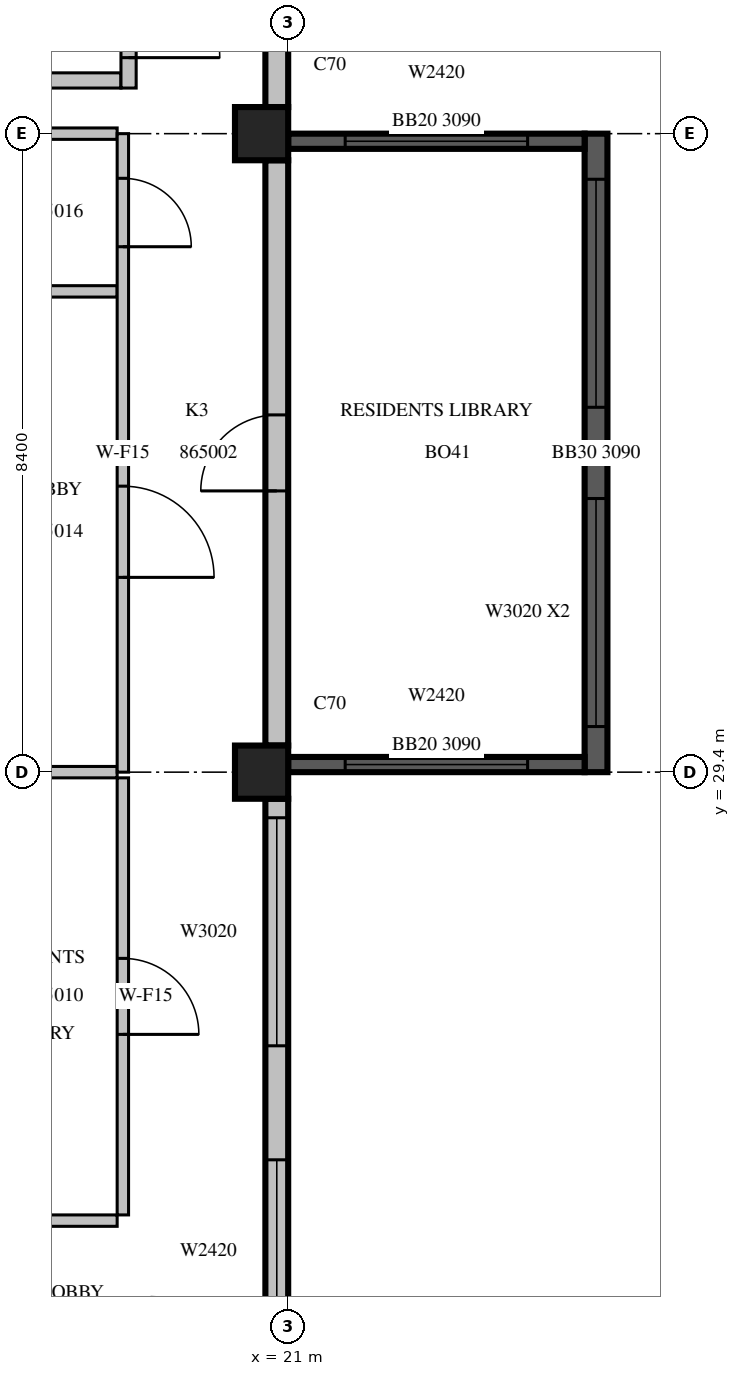
"""IFC4 building model, lengths in metres.
Left out: names, types, materials, properties, quantities, classifications, styles, units other than length and angle.
Written with IfcOpenShell. Run it as: python <this file> out.ifc"""

import sys

from ifc_helpers import new_model, si_unit, direction, frame, frame_2d, origin, origin_2d, place, context, subcontext, project, spatial, rectangle, extrude, source, transform, mapped, element, fill, save


model = new_model("IFC4")
c1 = context("Model", 3, precision=1e-05, world=origin(), true_north=direction((0.0, 1.0)))
c2 = subcontext(c1, "Body", "Model", "MODEL_VIEW")
j1 = project(units=[si_unit("LENGTHUNIT", "METRE"), si_unit("PLANEANGLEUNIT", "RADIAN")], contexts=[c1])
p1 = place(None, origin())
s1 = spatial("IfcSite", under=j1, at=p1, CompositionType="ELEMENT")
p2 = place(p1, origin())
s2 = spatial("IfcBuilding", under=s1, at=p2, CompositionType="ELEMENT")
p3 = place(p2, frame((0.0, 0.0, 288.0)))
s3 = spatial("IfcBuildingStorey", under=s2, at=p3, CompositionType="ELEMENT", Elevation=288.0)
m1 = source(origin(), c2, "Body", "SweptSolid", [
    extrude(rectangle(XDim=0.7, YDim=0.7, at=origin_2d()), origin(), (0.0, 0.0, 1.0), 3.5),
])
for number, where, z_axis, x_axis in (
    (1, (20.65, 29.4, 0.0), (0.0, 0.0, 1.0), (1.0, 0.0, 0.0)),
    (2, (20.65, 37.8, 0.0), (0.0, 0.0, 1.0), (1.0, 0.0, 0.0)),
):
    element("IfcColumn", number, at=place(p3, frame(where, z_axis=z_axis, x_axis=x_axis)), inside=s3, PredefinedType="COLUMN", context=c2, shape_type="MappedRepresentation", body=[
        mapped(m1, transform((0.0, 0.0, 0.0), scale=1.0)),
    ])
m2 = source(origin(), c2, "Body", "SweptSolid", [
    extrude(rectangle(XDim=7.45, YDim=0.3, at=frame_2d((3.725, 0.0))), origin(), (0.0, 0.0, 1.0), 3.1),
])
p4 = place(p3, frame((20.85, 21.6, 0.0), z_axis=(0.0, 0.0, 1.0), x_axis=(0.0, 1.0, 0.0)))
e3 = element("IfcWall", 3, at=p4, inside=s3, PredefinedType="STANDARD", context=c2, shape_type="MappedRepresentation", body=[
    mapped(m2, transform((0.0, 0.0, 0.0), scale=1.0)),
])
m3 = source(origin(), c2, "Body", "SweptSolid", [
    extrude(rectangle(XDim=2.4, YDim=2.0, at=frame_2d((1.2, 1.0))), frame((0.0, 0.16, 0.0), z_axis=(0.0, -1.0, 0.0), x_axis=(1.0, 0.0, 0.0)), (0.0, 0.0, 1.0), 0.32),
])
p5 = place(p4, frame((0.3, 0.0, 0.6)))
e4 = element("IfcOpeningElement", 4, at=p5, cuts=e3, PredefinedType="OPENING", context=c2, shape_type="MappedRepresentation", body=[
    mapped(m3, transform((0.0, 0.0, 0.0), scale=1.0)),
])
m4 = source(origin(), c2, "Body", "SweptSolid", [
    extrude(rectangle(XDim=3.0, YDim=2.0, at=frame_2d((1.5, 1.0))), frame((0.0, 0.16, 0.0), z_axis=(0.0, -1.0, 0.0), x_axis=(1.0, 0.0, 0.0)), (0.0, 0.0, 1.0), 0.32),
])
p6 = place(p4, frame((4.2, 0.0, 0.6)))
e5 = element("IfcOpeningElement", 5, at=p6, cuts=e3, PredefinedType="OPENING", context=c2, shape_type="MappedRepresentation", body=[
    mapped(m4, transform((0.0, 0.0, 0.0), scale=1.0)),
])
m5 = source(origin(), c2, "Body", "SweptSolid", [
    extrude(rectangle(XDim=7.7, YDim=0.3, at=frame_2d((3.85, 0.0))), origin(), (0.0, 0.0, 1.0), 3.1),
])
p7 = place(p3, frame((20.85, 29.75, 0.0), z_axis=(0.0, 0.0, 1.0), x_axis=(0.0, 1.0, 0.0)))
e6 = element("IfcWall", 6, at=p7, inside=s3, PredefinedType="STANDARD", context=c2, shape_type="MappedRepresentation", body=[
    mapped(m5, transform((0.0, 0.0, 0.0), scale=1.0)),
])
m6 = source(origin(), c2, "Body", "SweptSolid", [
    extrude(rectangle(XDim=1.0, YDim=2.1, at=frame_2d((0.5, 1.05))), frame((0.0, 0.16, 0.0), z_axis=(0.0, -1.0, 0.0), x_axis=(1.0, 0.0, 0.0)), (0.0, 0.0, 1.0), 0.32),
])
p8 = place(p7, frame((3.35, 0.0, 0.0)))
e7 = element("IfcOpeningElement", 7, at=p8, cuts=e6, PredefinedType="OPENING", context=c2, shape_type="MappedRepresentation", body=[
    mapped(m6, transform((0.0, 0.0, 0.0), scale=1.0)),
])
m7 = source(origin(), c2, "Body", "SweptSolid", [
    extrude(rectangle(XDim=5.53, YDim=0.3, at=frame_2d((2.765, 0.0))), origin(), (0.0, 0.0, 1.0), 3.1),
])
p9 = place(p3, frame((20.85, 38.15, 0.0), z_axis=(0.0, 0.0, 1.0), x_axis=(0.0, 1.0, 0.0)))
e8 = element("IfcWall", 8, at=p9, inside=s3, PredefinedType="STANDARD", context=c2, shape_type="MappedRepresentation", body=[
    mapped(m7, transform((0.0, 0.0, 0.0), scale=1.0)),
])
m8 = source(origin(), c2, "Body", "SweptSolid", [
    extrude(rectangle(XDim=3.6, YDim=2.0, at=frame_2d((1.8, 1.0))), frame((0.0, 0.16, 0.0), z_axis=(0.0, -1.0, 0.0), x_axis=(1.0, 0.0, 0.0)), (0.0, 0.0, 1.0), 0.32),
])
p10 = place(p9, frame((0.79, 0.0, 0.6)))
e9 = element("IfcOpeningElement", 9, at=p10, cuts=e8, PredefinedType="OPENING", context=c2, shape_type="MappedRepresentation", body=[
    mapped(m8, transform((0.0, 0.0, 0.0), scale=1.0)),
])
p11 = place(p3, frame((25.05, 29.4, 0.0), z_axis=(0.0, 0.0, 1.0), x_axis=(0.0, 1.0, 0.0)))
e10 = element("IfcWall", 10, at=p11, inside=s3, PredefinedType="SOLIDWALL", context=c2, shape_type="SweptSolid", body=[
    extrude(rectangle(XDim=8.4, YDim=0.3, at=frame_2d((4.2, 0.0))), origin(), (0.0, 0.0, 1.0), 3.09),
])
p12 = place(p11, frame((0.6, 0.0, 0.6)))
e11 = element("IfcOpeningElement", 11, at=p12, cuts=e10, PredefinedType="OPENING", context=c2, shape_type="MappedRepresentation", body=[
    mapped(m4, transform((0.0, 0.0, 0.0), scale=1.0)),
])
p13 = place(p11, frame((4.8, 0.0, 0.6)))
e12 = element("IfcOpeningElement", 12, at=p13, cuts=e10, PredefinedType="OPENING", context=c2, shape_type="MappedRepresentation", body=[
    mapped(m4, transform((0.0, 0.0, 0.0), scale=1.0)),
])
m9 = source(origin(), c2, "Body", "SweptSolid", [
    extrude(rectangle(XDim=3.9, YDim=0.2, at=frame_2d((1.95, 0.0))), origin(), (0.0, 0.0, 1.0), 3.09),
])
p14 = place(p3, frame((21.0, 29.5, 0.0), z_axis=(0.0, 0.0, 1.0), x_axis=(1.0, 0.0, 0.0)))
e13 = element("IfcWall", 13, at=p14, inside=s3, PredefinedType="SOLIDWALL", context=c2, shape_type="MappedRepresentation", body=[
    mapped(m9, transform((0.0, 0.0, 0.0), scale=1.0)),
])
m10 = source(origin(), c2, "Body", "SweptSolid", [
    extrude(rectangle(XDim=2.4, YDim=2.0, at=frame_2d((1.2, 1.0))), frame((0.0, 0.11, 0.0), z_axis=(0.0, -1.0, 0.0), x_axis=(1.0, 0.0, 0.0)), (0.0, 0.0, 1.0), 0.22),
])
p15 = place(p14, frame((0.75, 0.0, 0.6)))
e14 = element("IfcOpeningElement", 14, at=p15, cuts=e13, PredefinedType="OPENING", context=c2, shape_type="MappedRepresentation", body=[
    mapped(m10, transform((0.0, 0.0, 0.0), scale=1.0)),
])
p16 = place(p3, frame((21.0, 37.7, 0.0), z_axis=(0.0, 0.0, 1.0), x_axis=(1.0, 0.0, 0.0)))
e15 = element("IfcWall", 15, at=p16, inside=s3, PredefinedType="SOLIDWALL", context=c2, shape_type="MappedRepresentation", body=[
    mapped(m9, transform((0.0, 0.0, 0.0), scale=1.0)),
])
p17 = place(p16, frame((0.75, 0.0, 0.6)))
e16 = element("IfcOpeningElement", 16, at=p17, cuts=e15, PredefinedType="OPENING", context=c2, shape_type="MappedRepresentation", body=[
    mapped(m10, transform((0.0, 0.0, 0.0), scale=1.0)),
])
m11 = source(origin(), c2, "Body", "SweptSolid", [
    extrude(rectangle(XDim=8.0, YDim=0.2, at=frame_2d((4.0, 0.0))), origin(), (0.0, 0.0, 1.0), 3.1),
])
p18 = place(p3, frame((10.8, 38.5, 0.0), z_axis=(0.0, 0.0, 1.0), x_axis=(1.0, 0.0, 0.0)))
e17 = element("IfcWall", 17, at=p18, inside=s3, PredefinedType="PARTITIONING", context=c2, shape_type="MappedRepresentation", body=[
    mapped(m11, transform((0.0, 0.0, 0.0), scale=1.0)),
])
m12 = source(origin(), c2, "Body", "SweptSolid", [
    extrude(rectangle(XDim=5.45, YDim=0.2, at=frame_2d((2.725, 0.0))), origin(), (0.0, 0.0, 1.0), 3.1),
])
p19 = place(p3, frame((18.9, 38.4, 0.0), z_axis=(0.0, 0.0, 1.0), x_axis=(0.0, 1.0, 0.0)))
e18 = element("IfcWall", 18, at=p19, inside=s3, PredefinedType="PARTITIONING", context=c2, shape_type="MappedRepresentation", body=[
    mapped(m12, transform((0.0, 0.0, 0.0), scale=1.0)),
])
m13 = source(origin(), c2, "Body", "SweptSolid", [
    extrude(rectangle(XDim=1.2, YDim=2.1, at=frame_2d((0.6, 1.05))), frame((0.0, 0.11, 0.0), z_axis=(0.0, -1.0, 0.0), x_axis=(1.0, 0.0, 0.0)), (0.0, 0.0, 1.0), 0.22),
])
p20 = place(p19, frame((0.4, 0.0, 0.0)))
e19 = element("IfcOpeningElement", 19, at=p20, cuts=e18, PredefinedType="OPENING", context=c2, shape_type="MappedRepresentation", body=[
    mapped(m13, transform((0.0, 0.0, 0.0), scale=1.0)),
])
m14 = source(origin(), c2, "Body", "SweptSolid", [
    extrude(rectangle(XDim=0.9, YDim=2.1, at=frame_2d((0.45, 1.05))), frame((0.0, 0.11, 0.0), z_axis=(0.0, -1.0, 0.0), x_axis=(1.0, 0.0, 0.0)), (0.0, 0.0, 1.0), 0.22),
])
p21 = place(p19, frame((3.25, 0.0, 0.0)))
e20 = element("IfcOpeningElement", 20, at=p21, cuts=e18, PredefinedType="OPENING", context=c2, shape_type="MappedRepresentation", body=[
    mapped(m14, transform((0.0, 0.0, 0.0), scale=1.0)),
])
m15 = source(origin(), c2, "Body", "SweptSolid", [
    extrude(rectangle(XDim=4.575, YDim=0.15, at=frame_2d((2.288, 0.0))), origin(), (0.0, 0.0, 1.0), 3.1),
])
p22 = place(p3, frame((14.175, 23.5, 0.0), z_axis=(0.0, 0.0, 1.0), x_axis=(1.0, 0.0, 0.0)))
e21 = element("IfcWall", 21, at=p22, inside=s3, PredefinedType="PARTITIONING", context=c2, shape_type="MappedRepresentation", body=[
    mapped(m15, transform((0.0, 0.0, 0.0), scale=1.0)),
])
m16 = source(origin(), c2, "Body", "SweptSolid", [
    extrude(rectangle(XDim=0.9, YDim=2.1, at=frame_2d((0.45, 1.05))), frame((0.0, 0.085, 0.0), z_axis=(0.0, -1.0, 0.0), x_axis=(1.0, 0.0, 0.0)), (0.0, 0.0, 1.0), 0.17),
])
p23 = place(p22, frame((0.694, 0.0, 0.0)))
e22 = element("IfcOpeningElement", 22, at=p23, cuts=e21, PredefinedType="OPENING", context=c2, shape_type="MappedRepresentation", body=[
    mapped(m16, transform((0.0, 0.0, 0.0), scale=1.0)),
])
p24 = place(p3, frame((18.75, 29.4, 0.0), z_axis=(0.0, 0.0, 1.0), x_axis=(-1.0, 0.0, 0.0)))
e23 = element("IfcWall", 23, at=p24, inside=s3, PredefinedType="PARTITIONING", context=c2, shape_type="MappedRepresentation", body=[
    mapped(m15, transform((0.0, 0.0, 0.0), scale=1.0)),
])
m17 = source(origin(), c2, "Body", "SweptSolid", [
    extrude(rectangle(XDim=5.75, YDim=0.15, at=frame_2d((2.875, 0.0))), origin(), (0.0, 0.0, 1.0), 3.1),
])
p25 = place(p3, frame((18.825, 23.575, 0.0), z_axis=(0.0, 0.0, 1.0), x_axis=(0.0, 1.0, 0.0)))
e24 = element("IfcWall", 24, at=p25, inside=s3, PredefinedType="PARTITIONING", context=c2, shape_type="MappedRepresentation", body=[
    mapped(m17, transform((0.0, 0.0, 0.0), scale=1.0)),
])
m18 = source(origin(), c2, "Body", "SweptSolid", [
    extrude(rectangle(XDim=1.0, YDim=2.1, at=frame_2d((0.5, 1.05))), frame((0.0, 0.085, 0.0), z_axis=(0.0, -1.0, 0.0), x_axis=(1.0, 0.0, 0.0)), (0.0, 0.0, 1.0), 0.17),
])
p26 = place(p25, frame((2.375, 0.0, 0.0)))
e25 = element("IfcOpeningElement", 25, at=p26, cuts=e24, PredefinedType="OPENING", context=c2, shape_type="MappedRepresentation", body=[
    mapped(m18, transform((0.0, 0.0, 0.0), scale=1.0)),
])
m19 = source(origin(), c2, "Body", "SweptSolid", [
    extrude(rectangle(XDim=3.2, YDim=0.15, at=frame_2d((1.6, 0.0))), origin(), (0.0, 0.0, 1.0), 3.1),
])
for number, where, z_axis, x_axis in (
    (26, (18.75, 35.725, 0.0), (0.0, 0.0, 1.0), (-1.0, 0.0, 0.0)),
    (27, (18.75, 37.8, 0.0), (0.0, 0.0, 1.0), (-1.0, 0.0, 0.0)),
):
    element("IfcWall", number, at=place(p3, frame(where, z_axis=z_axis, x_axis=x_axis)), inside=s3, PredefinedType="PARTITIONING", context=c2, shape_type="MappedRepresentation", body=[
        mapped(m19, transform((0.0, 0.0, 0.0), scale=1.0)),
    ])
m20 = source(origin(), c2, "Body", "SweptSolid", [
    extrude(rectangle(XDim=8.4, YDim=0.15, at=frame_2d((4.2, 0.0))), origin(), (0.0, 0.0, 1.0), 3.1),
])
p27 = place(p3, frame((18.825, 29.4, 0.0), z_axis=(0.0, 0.0, 1.0), x_axis=(0.0, 1.0, 0.0)))
e28 = element("IfcWall", 28, at=p27, inside=s3, PredefinedType="PARTITIONING", context=c2, shape_type="MappedRepresentation", body=[
    mapped(m20, transform((0.0, 0.0, 0.0), scale=1.0)),
])
m21 = source(origin(), c2, "Body", "SweptSolid", [
    extrude(rectangle(XDim=1.2, YDim=2.1, at=frame_2d((0.6, 1.05))), frame((0.0, 0.085, 0.0), z_axis=(0.0, -1.0, 0.0), x_axis=(1.0, 0.0, 0.0)), (0.0, 0.0, 1.0), 0.17),
])
p28 = place(p27, frame((2.562, 0.0, 0.0)))
e29 = element("IfcOpeningElement", 29, at=p28, cuts=e28, PredefinedType="OPENING", context=c2, shape_type="MappedRepresentation", body=[
    mapped(m21, transform((0.0, 0.0, 0.0), scale=1.0)),
])
p29 = place(p27, frame((6.912, 0.0, 0.0)))
e30 = element("IfcOpeningElement", 30, at=p29, cuts=e28, PredefinedType="OPENING", context=c2, shape_type="MappedRepresentation", body=[
    mapped(m16, transform((0.0, 0.0, 0.0), scale=1.0)),
])
m22 = source(origin(), c2, "Body", "SweptSolid", [
    extrude(rectangle(XDim=2.4, YDim=2.0, at=frame_2d((1.2, 1.0))), frame((0.0, 0.03, 0.0), z_axis=(0.0, -1.0, 0.0), x_axis=(1.0, 0.0, 0.0)), (0.0, 0.0, 1.0), 0.06),
])
p30 = place(p5, origin())
e31 = element("IfcWindow", 31, at=p30, inside=s3, PartitioningType="SINGLE_PANEL", PredefinedType="WINDOW", context=c2, shape_type="MappedRepresentation", body=[
    mapped(m22, transform((0.0, 0.0, 0.0), scale=1.0)),
])
fill(e4, e31)
m23 = source(origin(), c2, "Body", "SweptSolid", [
    extrude(rectangle(XDim=3.0, YDim=2.0, at=frame_2d((1.5, 1.0))), frame((0.0, 0.03, 0.0), z_axis=(0.0, -1.0, 0.0), x_axis=(1.0, 0.0, 0.0)), (0.0, 0.0, 1.0), 0.06),
])
p31 = place(p6, origin())
e32 = element("IfcWindow", 32, at=p31, inside=s3, PartitioningType="SINGLE_PANEL", PredefinedType="WINDOW", context=c2, shape_type="MappedRepresentation", body=[
    mapped(m23, transform((0.0, 0.0, 0.0), scale=1.0)),
])
fill(e5, e32)
p32 = place(p12, origin())
e33 = element("IfcWindow", 33, at=p32, inside=s3, PartitioningType="SINGLE_PANEL", PredefinedType="WINDOW", context=c2, shape_type="MappedRepresentation", body=[
    mapped(m23, transform((0.0, 0.0, 0.0), scale=1.0)),
])
fill(e11, e33)
p33 = place(p13, origin())
e34 = element("IfcWindow", 34, at=p33, inside=s3, PartitioningType="SINGLE_PANEL", PredefinedType="WINDOW", context=c2, shape_type="MappedRepresentation", body=[
    mapped(m23, transform((0.0, 0.0, 0.0), scale=1.0)),
])
fill(e12, e34)
p34 = place(p15, origin())
e35 = element("IfcWindow", 35, at=p34, inside=s3, PartitioningType="SINGLE_PANEL", PredefinedType="WINDOW", context=c2, shape_type="MappedRepresentation", body=[
    mapped(m22, transform((0.0, 0.0, 0.0), scale=1.0)),
])
fill(e14, e35)
p35 = place(p17, origin())
e36 = element("IfcWindow", 36, at=p35, inside=s3, PartitioningType="SINGLE_PANEL", PredefinedType="WINDOW", context=c2, shape_type="MappedRepresentation", body=[
    mapped(m22, transform((0.0, 0.0, 0.0), scale=1.0)),
])
fill(e16, e36)
m24 = source(origin(), c2, "Body", "SweptSolid", [
    extrude(rectangle(XDim=1.2, YDim=2.1, at=frame_2d((0.6, 1.05))), frame((0.0, 0.025, 0.0), z_axis=(0.0, -1.0, 0.0), x_axis=(1.0, 0.0, 0.0)), (0.0, 0.0, 1.0), 0.05),
])
p36 = place(p20, origin())
e37 = element("IfcDoor", 37, at=p36, inside=s3, OperationType="SINGLE_SWING_RIGHT", PredefinedType="DOOR", context=c2, shape_type="MappedRepresentation", body=[
    mapped(m24, transform((0.0, 0.0, 0.0), scale=1.0)),
])
fill(e19, e37)
m25 = source(origin(), c2, "Body", "SweptSolid", [
    extrude(rectangle(XDim=1.0, YDim=2.1, at=frame_2d((0.5, 1.05))), frame((0.0, 0.025, 0.0), z_axis=(0.0, -1.0, 0.0), x_axis=(1.0, 0.0, 0.0)), (0.0, 0.0, 1.0), 0.05),
])
p37 = place(p26, origin())
e38 = element("IfcDoor", 38, at=p37, inside=s3, OperationType="SINGLE_SWING_RIGHT", PredefinedType="DOOR", context=c2, shape_type="MappedRepresentation", body=[
    mapped(m25, transform((0.0, 0.0, 0.0), scale=1.0)),
])
fill(e25, e38)
p38 = place(p28, origin())
e39 = element("IfcDoor", 39, at=p38, inside=s3, OperationType="SINGLE_SWING_RIGHT", PredefinedType="DOOR", context=c2, shape_type="MappedRepresentation", body=[
    mapped(m24, transform((0.0, 0.0, 0.0), scale=1.0)),
])
fill(e29, e39)
m26 = source(origin(), c2, "Body", "SweptSolid", [
    extrude(rectangle(XDim=0.9, YDim=2.1, at=frame_2d((0.45, 1.05))), frame((0.0, 0.025, 0.0), z_axis=(0.0, -1.0, 0.0), x_axis=(1.0, 0.0, 0.0)), (0.0, 0.0, 1.0), 0.05),
])
p39 = place(p29, origin())
e40 = element("IfcDoor", 40, at=p39, inside=s3, OperationType="SINGLE_SWING_RIGHT", PredefinedType="DOOR", context=c2, shape_type="MappedRepresentation", body=[
    mapped(m26, transform((0.0, 0.0, 0.0), scale=1.0)),
])
fill(e30, e40)
p40 = place(p8, origin())
e41 = element("IfcDoor", 41, at=p40, inside=s3, OperationType="SINGLE_SWING_LEFT", PredefinedType="DOOR", context=c2, shape_type="MappedRepresentation", body=[
    mapped(m25, transform((0.0, 0.0, 0.0), scale=1.0)),
])
fill(e7, e41)
save(model, sys.argv[1])
